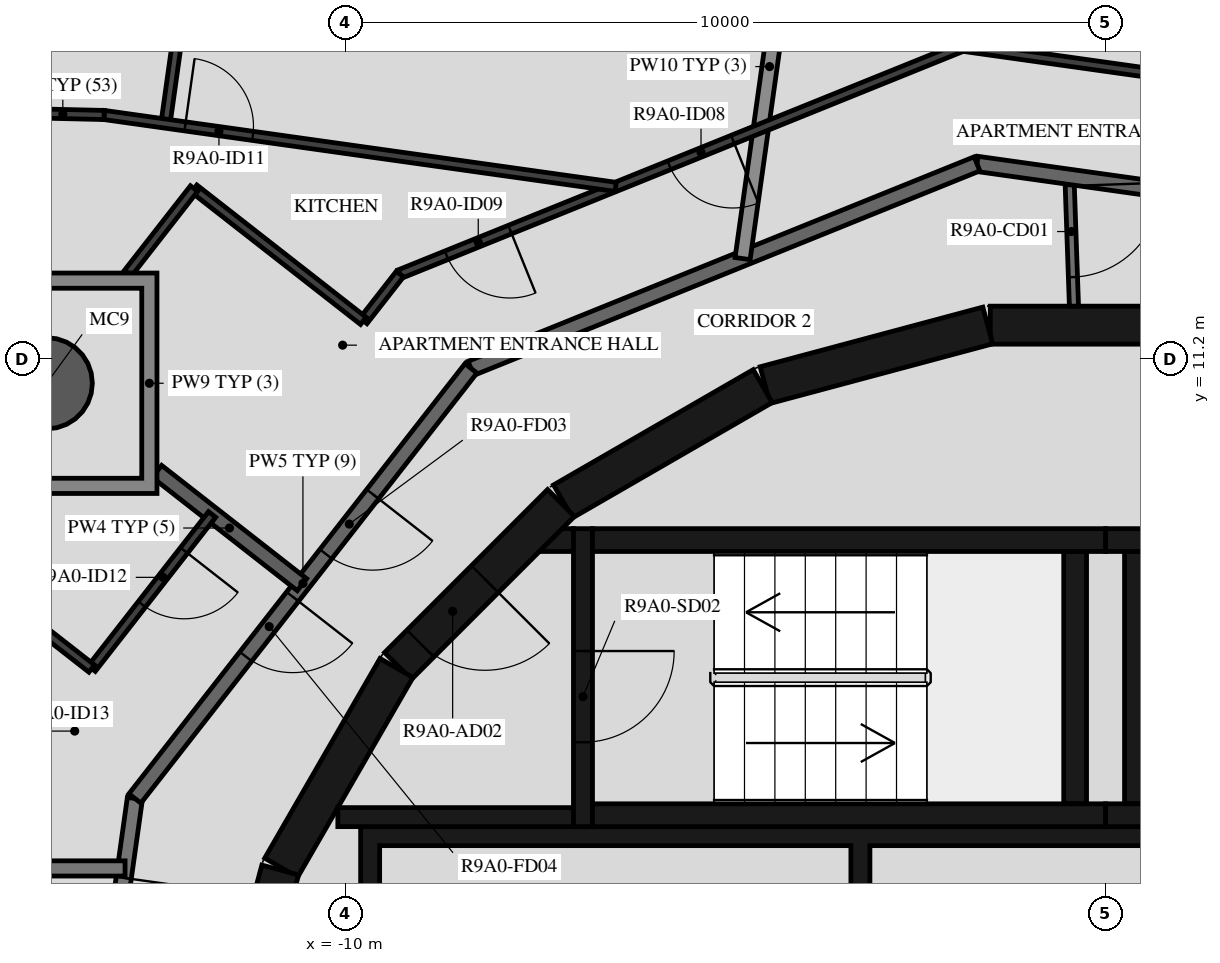
"""IFC4 building model, lengths in metres.
Left out: names, types, materials, properties, quantities, classifications, styles, units other than length and angle.
Written with IfcOpenShell. Run it as: python <this file> out.ifc"""

import sys

from ifc_helpers import new_model, si_unit, direction, frame, frame_2d, origin, origin_2d, place, context, subcontext, project, spatial, polyline, rectangle, hollow_circle, outline, extrude, element, fill, save


model = new_model("IFC4")
c1 = context("Model", 3, precision=1e-05, world=origin(), true_north=direction((0.0, 1.0)))
c2 = subcontext(c1, "Body", "Model", "MODEL_VIEW")
j1 = project(units=[si_unit("LENGTHUNIT", "METRE"), si_unit("PLANEANGLEUNIT", "RADIAN")], contexts=[c1])
p1 = place(None, origin())
s1 = spatial("IfcSite", under=j1, at=p1, CompositionType="ELEMENT")
p2 = place(p1, origin())
s2 = spatial("IfcBuilding", under=s1, at=p2, CompositionType="ELEMENT")
p3 = place(p2, frame((0.0, 0.0, 333.0)))
s3 = spatial("IfcBuildingStorey", under=s2, at=p3, CompositionType="ELEMENT", Elevation=333.0)
p4 = place(p3, frame((-13.929, 10.883, -0.45), z_axis=(0.0, 0.0, 1.0), x_axis=(1.0, 0.0, 0.0)))
e1 = element("IfcColumn", 1, at=p4, inside=s3, PredefinedType="COLUMN", context=c2, shape_type="SweptSolid", body=[
    extrude(hollow_circle(Radius=0.6, WallThickness=0.03, at=origin_2d()), origin(), (0.0, 0.0, 1.0), 3.57),
])
for number, where, z_axis, x_axis in (
    (2, (1.516, 11.647, 0.0), (0.0, 0.0, 1.0), (-1.0, 0.0, 0.0)),
    (3, (-1.55, 11.643, 0.0), (0.0, 0.0, 1.0), (-0.966, -0.259, 0.0)),
    (4, (-4.51, 10.845, 0.0), (0.0, 0.0, 1.0), (-0.866, -0.5, 0.0)),
):
    element("IfcWall", number, at=place(p3, frame(where, z_axis=z_axis, x_axis=x_axis)), inside=s3, PredefinedType="SHEAR", context=c2, shape_type="SweptSolid", body=[
        extrude(rectangle(XDim=3.033, YDim=0.5, at=frame_2d((1.516, 0.0))), origin(), (0.0, 0.0, 1.0), 3.12),
    ])
p5 = place(p3, frame((-7.164, 9.308, 0.0), z_axis=(0.0, 0.0, 1.0), x_axis=(-0.707106781187, -0.707106781187, 0.0)))
e5 = element("IfcWall", 5, at=p5, inside=s3, PredefinedType="SHEAR", context=c2, shape_type="SweptSolid", body=[
    extrude(rectangle(XDim=3.032, YDim=0.5, at=frame_2d((1.516, 0.0))), origin(), (0.0, 0.0, 1.0), 3.12),
])
p6 = place(p5, frame((1.416, 0.0, 0.0)))
e6 = element("IfcOpeningElement", 6, at=p6, cuts=e5, PredefinedType="OPENING", context=c2, shape_type="SweptSolid", body=[
    extrude(rectangle(XDim=1.2, YDim=2.1, at=frame_2d((0.6, 1.05))), frame((0.0, 0.26, 0.0), z_axis=(0.0, -1.0, 0.0), x_axis=(1.0, 0.0, 0.0)), (0.0, 0.0, 1.0), 0.52),
])
for number, where, z_axis, x_axis in (
    (7, (-9.329, 7.137, 0.0), (0.0, 0.0, 1.0), (-0.5, -0.866, 0.0)),
    (8, (-10.858, 4.479, 0.0), (0.0, 0.0, 1.0), (-0.259, -0.966, 0.0)),
):
    element("IfcWall", number, at=place(p3, frame(where, z_axis=z_axis, x_axis=x_axis)), inside=s3, PredefinedType="SHEAR", context=c2, shape_type="SweptSolid", body=[
        extrude(rectangle(XDim=3.033, YDim=0.5, at=frame_2d((1.516, 0.0))), origin(), (0.0, 0.0, 1.0), 3.12),
    ])
for number, where, z_axis, x_axis in (
    (9, (0.0, 5.2, 0.0), (0.0, 0.0, 1.0), (1.0, 0.0, 0.0)),
    (10, (0.0, 8.82, 0.0), (0.0, 0.0, 1.0), (1.0, 0.0, 0.0)),
):
    element("IfcWall", number, at=place(p3, frame(where, z_axis=z_axis, x_axis=x_axis)), inside=s3, PredefinedType="SHEAR", context=c2, shape_type="SweptSolid", body=[
        extrude(rectangle(XDim=6.75, YDim=0.3, at=frame_2d((3.375, 0.0))), origin(), (0.0, 0.0, 1.0), 3.12),
    ])
p7 = place(p3, frame((0.4, 5.35, 0.0), z_axis=(0.0, 0.0, 1.0), x_axis=(0.0, 1.0, 0.0)))
e11 = element("IfcWall", 11, at=p7, inside=s3, PredefinedType="SHEAR", context=c2, shape_type="SweptSolid", body=[
    extrude(rectangle(XDim=3.32, YDim=0.3, at=frame_2d((1.66, 0.0))), origin(), (0.0, 0.0, 1.0), 3.12),
])
for number, where, z_axis, x_axis in (
    (12, (-6.75, 5.2, 0.0), (0.0, 0.0, 1.0), (1.0, 0.0, 0.0)),
    (13, (-6.75, 8.82, 0.0), (0.0, 0.0, 1.0), (1.0, 0.0, 0.0)),
):
    element("IfcWall", number, at=place(p3, frame(where, z_axis=z_axis, x_axis=x_axis)), inside=s3, PredefinedType="SHEAR", context=c2, shape_type="SweptSolid", body=[
        extrude(rectangle(XDim=6.75, YDim=0.3, at=frame_2d((3.375, 0.0))), origin(), (0.0, 0.0, 1.0), 3.12),
    ])
p8 = place(p3, frame((-0.4, 5.35, 0.0), z_axis=(0.0, 0.0, 1.0), x_axis=(0.0, 1.0, 0.0)))
e14 = element("IfcWall", 14, at=p8, inside=s3, PredefinedType="SHEAR", context=c2, shape_type="SweptSolid", body=[
    extrude(rectangle(XDim=3.32, YDim=0.3, at=frame_2d((1.66, 0.0))), origin(), (0.0, 0.0, 1.0), 3.12),
])
p9 = place(p3, frame((-6.875, 8.97, 0.0), z_axis=(0.0, 0.0, 1.0), x_axis=(0.0, -1.0, 0.0)))
e15 = element("IfcWall", 15, at=p9, inside=s3, PredefinedType="SHEAR", context=c2, shape_type="SweptSolid", body=[
    extrude(rectangle(XDim=3.92, YDim=0.25, at=frame_2d((1.96, 0.0))), origin(), (0.0, 0.0, 1.0), 3.12),
])
p10 = place(p9, frame((1.61, 0.0, 0.0)))
e16 = element("IfcOpeningElement", 16, at=p10, cuts=e15, PredefinedType="OPENING", context=c2, shape_type="SweptSolid", body=[
    extrude(rectangle(XDim=1.2, YDim=2.1, at=frame_2d((0.6, 1.05))), frame((0.0, 0.135, 0.0), z_axis=(0.0, -1.0, 0.0), x_axis=(1.0, 0.0, 0.0)), (0.0, 0.0, 1.0), 0.27),
])
p11 = place(p3, frame((-7.0, 5.175, 0.0), z_axis=(0.0, 0.0, 1.0), x_axis=(-1.0, 0.0, 0.0)))
e17 = element("IfcWall", 17, at=p11, inside=s3, PredefinedType="SHEAR", context=c2, shape_type="SweptSolid", body=[
    extrude(rectangle(XDim=3.1, YDim=0.25, at=frame_2d((1.55, 0.0))), origin(), (0.0, 0.0, 1.0), 3.12),
])
p12 = place(p3, origin())
e18 = element("IfcWall", 18, at=p12, inside=s3, PredefinedType="SHEAR", context=c2, shape_type="SweptSolid", body=[
    extrude(outline(polyline([(-7.148, 8.97), (-7.0, 8.97), (-7.0, 8.67), (-7.448, 8.67), (-7.148, 8.97)])), origin(), (0.0, 0.0, 1.0), 3.12),
])
p13 = place(p3, origin())
e19 = element("IfcWall", 19, at=p13, inside=s3, PredefinedType="SHEAR", context=c2, shape_type="SweptSolid", body=[
    extrude(outline(polyline([(-9.8, 1.9), (-9.55, 1.9), (-9.55, 4.8), (-3.35, 4.8), (-3.35, 1.9), (-3.1, 1.9), (-3.1, 4.8), (3.1, 4.8), (3.1, 1.9), (3.35, 1.9), (3.35, 4.8), (5.25, 4.8), (5.25, 1.9), (5.5, 1.9), (5.5, 4.8), (7.4, 4.8), (7.4, 1.9), (7.65, 1.9), (7.65, 4.8), (9.55, 4.8), (9.55, 1.9), (9.8, 1.9), (9.8, 4.8), (9.8, 5.05), (-9.8, 5.05), (-9.8, 4.8), (-9.8, 1.9)])), origin(), (0.0, 0.0, 1.0), 3.12),
])
p14 = place(p3, frame((-0.475, 13.598, 0.0), z_axis=(0.0, 0.0, 1.0), x_axis=(0.034852521429, -0.999392466326, 0.0)))
e20 = element("IfcWall", 20, at=p14, inside=s3, PredefinedType="PARTITIONING", context=c2, shape_type="SweptSolid", body=[
    extrude(rectangle(XDim=1.702, YDim=0.12, at=frame_2d((0.851, 0.0))), origin(), (0.0, 0.0, 1.0), 3.12),
])
p15 = place(p14, frame((0.12, 0.0, 0.0)))
e21 = element("IfcOpeningElement", 21, at=p15, cuts=e20, PredefinedType="OPENING", context=c2, shape_type="SweptSolid", body=[
    extrude(rectangle(XDim=1.2, YDim=2.1, at=frame_2d((0.6, 1.05))), frame((0.0, 0.07, 0.0), z_axis=(0.0, -1.0, 0.0), x_axis=(1.0, 0.0, 0.0)), (0.0, 0.0, 1.0), 0.14),
])
p16 = place(p3, frame((5.42, 12.77, 0.0), z_axis=(0.0, 0.0, 1.0), x_axis=(-0.990270565508, 0.139155334385, 0.0)))
e22 = element("IfcWall", 22, at=p16, inside=s3, PredefinedType="STANDARD", context=c2, shape_type="SweptSolid", body=[
    extrude(rectangle(XDim=7.181, YDim=0.2, at=frame_2d((3.59, 0.0))), origin(), (0.0, 0.0, 1.0), 3.12),
])
p17 = place(p3, frame((-12.77, 5.42, 0.0), z_axis=(0.0, 0.0, 1.0), x_axis=(-0.139155334385, -0.990270565508, 0.0)))
e23 = element("IfcWall", 23, at=p17, inside=s3, PredefinedType="STANDARD", context=c2, shape_type="SweptSolid", body=[
    extrude(rectangle(XDim=7.181, YDim=0.2, at=frame_2d((3.59, 0.0))), origin(), (0.0, 0.0, 1.0), 3.12),
])
p18 = place(p17, frame((1.055, 0.0, 0.0)))
e24 = element("IfcOpeningElement", 24, at=p18, cuts=e23, PredefinedType="OPENING", context=c2, shape_type="SweptSolid", body=[
    extrude(rectangle(XDim=1.8, YDim=2.1, at=frame_2d((0.9, 1.05))), frame((0.0, 0.11, 0.0), z_axis=(0.0, -1.0, 0.0), x_axis=(1.0, 0.0, 0.0)), (0.0, 0.0, 1.0), 0.22),
])
p19 = place(p3, frame((-1.691, 13.769, 0.0), z_axis=(0.0, 0.0, 1.0), x_axis=(-0.92717916932, -0.374618189599, 0.0)))
e25 = element("IfcWall", 25, at=p19, inside=s3, PredefinedType="STANDARD", context=c2, shape_type="SweptSolid", body=[
    extrude(rectangle(XDim=7.181, YDim=0.2, at=frame_2d((3.591, 0.0))), origin(), (0.0, 0.0, 1.0), 3.12),
])
p20 = place(p3, frame((-8.349, 11.079, 0.0), z_axis=(0.0, 0.0, 1.0), x_axis=(-0.615669112324, -0.78800478687, 0.0)))
e26 = element("IfcWall", 26, at=p20, inside=s3, PredefinedType="STANDARD", context=c2, shape_type="SweptSolid", body=[
    extrude(rectangle(XDim=7.181, YDim=0.2, at=frame_2d((3.591, 0.0))), origin(), (0.0, 0.0, 1.0), 3.12),
])
p21 = place(p20, frame((2.1, 0.0, 0.0)))
e27 = element("IfcOpeningElement", 27, at=p21, cuts=e26, PredefinedType="OPENING", context=c2, shape_type="SweptSolid", body=[
    extrude(rectangle(XDim=1.0, YDim=2.1, at=frame_2d((0.5, 1.05))), frame((0.0, 0.11, 0.0), z_axis=(0.0, -1.0, 0.0), x_axis=(1.0, 0.0, 0.0)), (0.0, 0.0, 1.0), 0.22),
])
p22 = place(p20, frame((3.811, 0.0, 0.0)))
e28 = element("IfcOpeningElement", 28, at=p22, cuts=e26, PredefinedType="OPENING", context=c2, shape_type="SweptSolid", body=[
    extrude(rectangle(XDim=1.0, YDim=2.1, at=frame_2d((0.5, 1.05))), frame((0.0, 0.11, 0.0), z_axis=(0.0, -1.0, 0.0), x_axis=(1.0, 0.0, 0.0)), (0.0, 0.0, 1.0), 0.22),
])
p23 = place(p3, frame((-12.899, 4.5, 0.0), z_axis=(0.0, 0.0, 1.0), x_axis=(-1.0, 0.0, 0.0)))
e29 = element("IfcWall", 29, at=p23, inside=s3, PredefinedType="STANDARD", context=c2, shape_type="SweptSolid", body=[
    extrude(rectangle(XDim=6.5, YDim=0.2, at=frame_2d((3.25, 0.0))), origin(), (0.0, 0.0, 1.0), 3.12),
])
p24 = place(p3, frame((-4.065, 17.575, 0.0), z_axis=(0.0, 0.0, 1.0), x_axis=(-0.139163175955, -0.990269463559, 0.0)))
e30 = element("IfcWall", 30, at=p24, inside=s3, PredefinedType="STANDARD", context=c2, shape_type="SweptSolid", body=[
    extrude(rectangle(XDim=5.102, YDim=0.2, at=frame_2d((2.551, 0.0))), origin(), (0.0, 0.0, 1.0), 2.73),
])
p25 = place(p3, frame((-12.479, 9.723, 0.0), z_axis=(0.0, 0.0, 1.0), x_axis=(0.788030490991, -0.615636211792, 0.0)))
e31 = element("IfcWall", 31, at=p25, inside=s3, PredefinedType="STANDARD", context=c2, shape_type="SweptSolid", body=[
    extrude(rectangle(XDim=2.42, YDim=0.2, at=frame_2d((1.21, 0.0))), origin(), (0.0, 0.0, 1.0), 3.12),
])
p26 = place(p3, frame((6.027, 14.199, 0.0), z_axis=(0.0, 0.0, 1.0), x_axis=(-0.990271593532, 0.139148018469, 0.0)))
e32 = element("IfcWall", 32, at=p26, inside=s3, PredefinedType="PARTITIONING", context=c2, shape_type="SweptSolid", body=[
    extrude(rectangle(XDim=7.985, YDim=0.12, at=frame_2d((3.992, 0.0))), origin(), (0.0, 0.0, 1.0), 3.12),
])
p27 = place(p26, frame((2.898, 0.0, 0.0)))
e33 = element("IfcOpeningElement", 33, at=p27, cuts=e32, PredefinedType="OPENING", context=c2, shape_type="SweptSolid", body=[
    extrude(rectangle(XDim=0.9, YDim=2.1, at=frame_2d((0.45, 1.05))), frame((0.0, 0.07, 0.0), z_axis=(0.0, -1.0, 0.0), x_axis=(1.0, 0.0, 0.0)), (0.0, 0.0, 1.0), 0.14),
])
p28 = place(p3, frame((-1.88, 15.311, 0.0), z_axis=(0.0, 0.0, 1.0), x_axis=(-0.927184866592, -0.374604088557, 0.0)))
e34 = element("IfcWall", 34, at=p28, inside=s3, PredefinedType="PARTITIONING", context=c2, shape_type="SweptSolid", body=[
    extrude(rectangle(XDim=7.985, YDim=0.12, at=frame_2d((3.993, 0.0))), origin(), (0.0, 0.0, 1.0), 3.12),
])
p29 = place(p28, frame((3.262, 0.0, 0.0)))
e35 = element("IfcOpeningElement", 35, at=p29, cuts=e34, PredefinedType="OPENING", context=c2, shape_type="SweptSolid", body=[
    extrude(rectangle(XDim=0.9, YDim=2.1, at=frame_2d((0.45, 1.05))), frame((0.0, 0.07, 0.0), z_axis=(0.0, -1.0, 0.0), x_axis=(1.0, 0.0, 0.0)), (0.0, 0.0, 1.0), 0.14),
])
p30 = place(p28, frame((6.423, 0.0, 0.0)))
e36 = element("IfcOpeningElement", 36, at=p30, cuts=e34, PredefinedType="OPENING", context=c2, shape_type="SweptSolid", body=[
    extrude(rectangle(XDim=0.9, YDim=2.1, at=frame_2d((0.45, 1.05))), frame((0.0, 0.07, 0.0), z_axis=(0.0, -1.0, 0.0), x_axis=(1.0, 0.0, 0.0)), (0.0, 0.0, 1.0), 0.14),
])
p31 = place(p3, frame((-9.283, 12.319, 0.0), z_axis=(0.0, 0.0, 1.0), x_axis=(-0.615735018346, -0.787953289975, 0.0)))
e37 = element("IfcWall", 37, at=p31, inside=s3, PredefinedType="PARTITIONING", context=c2, shape_type="SweptSolid", body=[
    extrude(rectangle(XDim=0.781, YDim=0.12, at=frame_2d((0.391, 0.0))), origin(), (0.0, 0.0, 1.0), 3.12),
])
p32 = place(p3, frame((-9.764, 11.704, 0.0), z_axis=(0.0, 0.0, 1.0), x_axis=(-0.787996873396, 0.615679240772, 0.0)))
e38 = element("IfcWall", 38, at=p32, inside=s3, PredefinedType="PARTITIONING", context=c2, shape_type="SweptSolid", body=[
    extrude(rectangle(XDim=2.826, YDim=0.12, at=frame_2d((1.413, 0.0))), origin(), (0.0, 0.0, 1.0), 3.12),
])
p33 = place(p3, frame((-11.992, 13.444, 0.0), z_axis=(0.0, 0.0, 1.0), x_axis=(-0.615593635541, -0.788063751153, 0.0)))
e39 = element("IfcWall", 39, at=p33, inside=s3, PredefinedType="PARTITIONING", context=c2, shape_type="SweptSolid", body=[
    extrude(rectangle(XDim=1.41, YDim=0.12, at=frame_2d((0.705, 0.0))), origin(), (0.0, 0.0, 1.0), 3.12),
])
p34 = place(p3, frame((-11.755, 18.656, 0.0), z_axis=(0.0, 0.0, 1.0), x_axis=(-0.13916046232, -0.990269844904, 0.0)))
e40 = element("IfcWall", 40, at=p34, inside=s3, PredefinedType="PARTITIONING", context=c2, shape_type="SweptSolid", body=[
    extrude(rectangle(XDim=4.4, YDim=0.12, at=frame_2d((2.2, 0.0))), origin(), (0.0, 0.0, 1.0), 2.73),
])
p35 = place(p34, frame((0.2, 0.0, 0.0)))
e41 = element("IfcOpeningElement", 41, at=p35, cuts=e40, PredefinedType="OPENING", context=c2, shape_type="SweptSolid", body=[
    extrude(rectangle(XDim=0.9, YDim=2.1, at=frame_2d((0.45, 1.05))), frame((0.0, 0.07, 0.0), z_axis=(0.0, -1.0, 0.0), x_axis=(1.0, 0.0, 0.0)), (0.0, 0.0, 1.0), 0.14),
])
p36 = place(p3, frame((-13.175, 14.412, 0.0), z_axis=(0.0, 0.0, 1.0), x_axis=(0.990264549393, -0.139198140128, 0.0)))
e42 = element("IfcWall", 42, at=p36, inside=s3, PredefinedType="PARTITIONING", context=c2, shape_type="SweptSolid", body=[
    extrude(rectangle(XDim=6.796, YDim=0.12, at=frame_2d((3.398, 0.0))), origin(), (0.0, 0.0, 1.0), 3.12),
])
p37 = place(p36, frame((1.075, 0.0, 0.0)))
e43 = element("IfcOpeningElement", 43, at=p37, cuts=e42, PredefinedType="OPENING", context=c2, shape_type="SweptSolid", body=[
    extrude(rectangle(XDim=0.9, YDim=2.1, at=frame_2d((0.45, 1.05))), frame((0.0, 0.07, 0.0), z_axis=(0.0, -1.0, 0.0), x_axis=(1.0, 0.0, 0.0)), (0.0, 0.0, 1.0), 0.14),
])
p38 = place(p3, frame((-14.261, 14.438, 0.0), z_axis=(0.0, 0.0, 1.0), x_axis=(0.999732237365, -0.023139869764, 0.0)))
e44 = element("IfcWall", 44, at=p38, inside=s3, PredefinedType="PARTITIONING", context=c2, shape_type="SweptSolid", body=[
    extrude(rectangle(XDim=1.087, YDim=0.12, at=frame_2d((0.543, 0.0))), origin(), (0.0, 0.0, 1.0), 3.12),
])
p39 = place(p3, frame((-11.754, 9.157, 0.0), z_axis=(0.0, 0.0, 1.0), x_axis=(-0.615568539365, -0.788083354312, 0.0)))
e45 = element("IfcWall", 45, at=p39, inside=s3, PredefinedType="PARTITIONING", context=c2, shape_type="SweptSolid", body=[
    extrude(rectangle(XDim=2.573, YDim=0.12, at=frame_2d((1.286, 0.0))), origin(), (0.0, 0.0, 1.0), 3.12),
])
p40 = place(p39, frame((0.6, 0.0, 0.0)))
e46 = element("IfcOpeningElement", 46, at=p40, cuts=e45, PredefinedType="OPENING", context=c2, shape_type="SweptSolid", body=[
    extrude(rectangle(XDim=0.9, YDim=2.1, at=frame_2d((0.45, 1.05))), frame((0.0, 0.07, 0.0), z_axis=(0.0, -1.0, 0.0), x_axis=(1.0, 0.0, 0.0)), (0.0, 0.0, 1.0), 0.14),
])
p41 = place(p3, frame((-13.338, 7.129, 0.0), z_axis=(0.0, 0.0, 1.0), x_axis=(-0.787938483233, 0.615753965997, 0.0)))
e47 = element("IfcWall", 47, at=p41, inside=s3, PredefinedType="PARTITIONING", context=c2, shape_type="SweptSolid", body=[
    extrude(rectangle(XDim=1.853, YDim=0.12, at=frame_2d((0.927, 0.0))), origin(), (0.0, 0.0, 1.0), 3.12),
])
p42 = place(p3, origin())
e48 = element("IfcWall", 48, at=p42, inside=s3, PredefinedType="STANDARD", context=c2, shape_type="SweptSolid", body=[
    extrude(outline(polyline([(-12.479, 12.333), (-12.479, 9.433), (-15.379, 9.433), (-15.379, 12.333), (-12.479, 12.333)]), holes=[polyline([(-15.179, 9.633), (-12.679, 9.633), (-12.679, 12.133), (-15.179, 12.133), (-15.179, 9.633)])]), origin(), (0.0, 0.0, 1.0), 3.12),
])
p43 = place(p10, origin())
e49 = element("IfcDoor", 49, at=p43, inside=s3, OperationType="SINGLE_SWING_LEFT", PredefinedType="DOOR", context=c2, shape_type="SweptSolid", body=[
    extrude(rectangle(XDim=1.2, YDim=2.1, at=frame_2d((0.6, 1.05))), frame((0.0, 0.025, 0.0), z_axis=(0.0, -1.0, 0.0), x_axis=(1.0, 0.0, 0.0)), (0.0, 0.0, 1.0), 0.05),
])
fill(e16, e49)
p44 = place(p6, origin())
e50 = element("IfcDoor", 50, at=p44, inside=s3, OperationType="SINGLE_SWING_RIGHT", PredefinedType="DOOR", context=c2, shape_type="SweptSolid", body=[
    extrude(rectangle(XDim=1.2, YDim=2.1, at=frame_2d((0.6, 1.05))), frame((0.0, 0.025, 0.0), z_axis=(0.0, -1.0, 0.0), x_axis=(1.0, 0.0, 0.0)), (0.0, 0.0, 1.0), 0.05),
])
fill(e6, e50)
p45 = place(p21, origin())
e51 = element("IfcDoor", 51, at=p45, inside=s3, OperationType="SINGLE_SWING_RIGHT", PredefinedType="DOOR", context=c2, shape_type="SweptSolid", body=[
    extrude(rectangle(XDim=1.0, YDim=2.1, at=frame_2d((0.5, 1.05))), frame((0.0, 0.025, 0.0), z_axis=(0.0, -1.0, 0.0), x_axis=(1.0, 0.0, 0.0)), (0.0, 0.0, 1.0), 0.05),
])
fill(e27, e51)
p46 = place(p29, origin())
e52 = element("IfcDoor", 52, at=p46, inside=s3, OperationType="SINGLE_SWING_RIGHT", PredefinedType="DOOR", context=c2, shape_type="SweptSolid", body=[
    extrude(rectangle(XDim=0.9, YDim=2.1, at=frame_2d((0.45, 1.05))), frame((0.0, 0.025, 0.0), z_axis=(0.0, -1.0, 0.0), x_axis=(1.0, 0.0, 0.0)), (0.0, 0.0, 1.0), 0.05),
])
fill(e35, e52)
p47 = place(p30, origin())
e53 = element("IfcDoor", 53, at=p47, inside=s3, OperationType="SINGLE_SWING_RIGHT", PredefinedType="DOOR", context=c2, shape_type="SweptSolid", body=[
    extrude(rectangle(XDim=0.9, YDim=2.1, at=frame_2d((0.45, 1.05))), frame((0.0, 0.025, 0.0), z_axis=(0.0, -1.0, 0.0), x_axis=(1.0, 0.0, 0.0)), (0.0, 0.0, 1.0), 0.05),
])
fill(e36, e53)
p48 = place(p37, origin())
e54 = element("IfcDoor", 54, at=p48, inside=s3, OperationType="SINGLE_SWING_LEFT", PredefinedType="DOOR", context=c2, shape_type="SweptSolid", body=[
    extrude(rectangle(XDim=0.9, YDim=2.1, at=frame_2d((0.45, 1.05))), frame((0.0, 0.025, 0.0), z_axis=(0.0, -1.0, 0.0), x_axis=(1.0, 0.0, 0.0)), (0.0, 0.0, 1.0), 0.05),
])
fill(e43, e54)
p49 = place(p22, origin())
e55 = element("IfcDoor", 55, at=p49, inside=s3, OperationType="SINGLE_SWING_LEFT", PredefinedType="DOOR", context=c2, shape_type="SweptSolid", body=[
    extrude(rectangle(XDim=1.0, YDim=2.1, at=frame_2d((0.5, 1.05))), frame((0.0, 0.025, 0.0), z_axis=(0.0, -1.0, 0.0), x_axis=(1.0, 0.0, 0.0)), (0.0, 0.0, 1.0), 0.05),
])
fill(e28, e55)
p50 = place(p40, origin())
e56 = element("IfcDoor", 56, at=p50, inside=s3, OperationType="SINGLE_SWING_LEFT", PredefinedType="DOOR", context=c2, shape_type="SweptSolid", body=[
    extrude(rectangle(XDim=0.9, YDim=2.1, at=frame_2d((0.45, 1.05))), frame((0.0, 0.025, 0.0), z_axis=(0.0, -1.0, 0.0), x_axis=(1.0, 0.0, 0.0)), (0.0, 0.0, 1.0), 0.05),
])
fill(e46, e56)
p51 = place(p15, origin())
e57 = element("IfcDoor", 57, at=p51, inside=s3, OperationType="DOUBLE_DOOR_SINGLE_SWING", PredefinedType="DOOR", context=c2, shape_type="SweptSolid", body=[
    extrude(rectangle(XDim=1.2, YDim=2.1, at=frame_2d((0.6, 1.05))), frame((0.0, 0.025, 0.0), z_axis=(0.0, -1.0, 0.0), x_axis=(1.0, 0.0, 0.0)), (0.0, 0.0, 1.0), 0.05),
])
fill(e21, e57)
p52 = place(p18, origin())
e58 = element("IfcDoor", 58, at=p52, inside=s3, OperationType="DOUBLE_DOOR_SINGLE_SWING", PredefinedType="DOOR", context=c2, shape_type="SweptSolid", body=[
    extrude(rectangle(XDim=1.8, YDim=2.1, at=frame_2d((0.9, 1.05))), frame((0.0, 0.025, 0.0), z_axis=(0.0, -1.0, 0.0), x_axis=(1.0, 0.0, 0.0)), (0.0, 0.0, 1.0), 0.05),
])
fill(e24, e58)
save(model, sys.argv[1])
